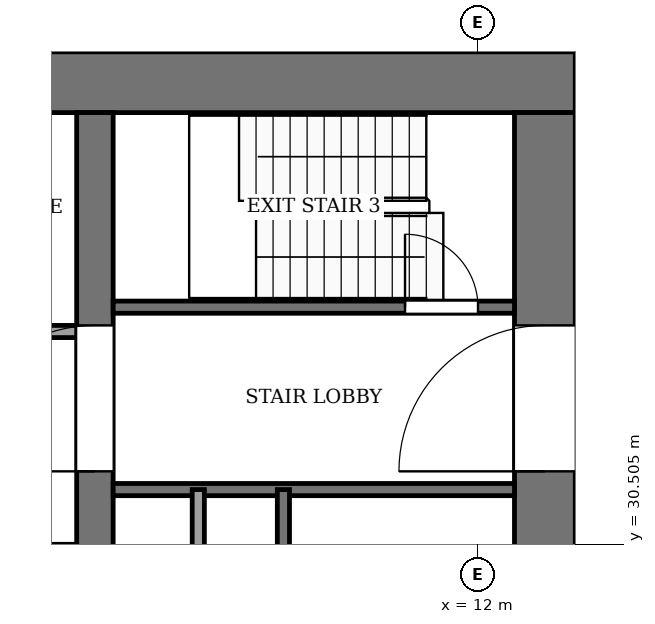
"""IFC4 building model, lengths in metres.
Left out: names, types, materials, properties, quantities, classifications, styles, units other than length and angle.
Written with IfcOpenShell. Run it as: python <this file> out.ifc"""

import sys

from ifc_helpers import new_model, si_unit, direction, frame, frame_2d, origin, place, context, subcontext, project, spatial, rectangle, extrude, element, fill, save


model = new_model("IFC4")
c1 = context("Model", 3, precision=1e-05, world=origin(), true_north=direction((0.0, 1.0)))
c2 = subcontext(c1, "Body", "Model", "MODEL_VIEW")
j1 = project(units=[si_unit("LENGTHUNIT", "METRE"), si_unit("PLANEANGLEUNIT", "RADIAN")], contexts=[c1])
p1 = place(None, origin())
s1 = spatial("IfcSite", under=j1, at=p1, CompositionType="ELEMENT")
p2 = place(p1, origin())
s2 = spatial("IfcBuilding", under=s1, at=p2, CompositionType="ELEMENT")
p3 = place(p2, frame((0.0, 0.0, 142.0)))
s3 = spatial("IfcBuildingStorey", under=s2, at=p3, CompositionType="ELEMENT", Elevation=142.0)
p4 = place(p3, frame((-13.6, 38.1, -0.13), z_axis=(0.0, 0.0, 1.0), x_axis=(1.0, 0.0, 0.0)))
e1 = element("IfcWall", 1, at=p4, inside=s3, PredefinedType="SHEAR", context=c2, shape_type="SweptSolid", body=[
    extrude(rectangle(XDim=27.2, YDim=1.0, at=frame_2d((13.6, 0.0))), origin(), (0.0, 0.0, 1.0), 4.0),
])
p5 = place(p3, frame((13.1, 18.4, -0.13), z_axis=(0.0, 0.0, 1.0), x_axis=(0.0, 1.0, 0.0)))
e2 = element("IfcWall", 2, at=p5, inside=s3, PredefinedType="SHEAR", context=c2, shape_type="SweptSolid", body=[
    extrude(rectangle(XDim=19.2, YDim=1.0, at=frame_2d((9.6, 0.0))), origin(), (0.0, 0.0, 1.0), 4.0),
])
p6 = place(p5, frame((2.8, 0.0, 0.13)))
e3 = element("IfcOpeningElement", 3, at=p6, cuts=e2, PredefinedType="OPENING", context=c2, shape_type="SweptSolid", body=[
    extrude(rectangle(XDim=2.4, YDim=2.4, at=frame_2d((1.2, 1.2))), frame((0.0, 0.51, 0.0), z_axis=(0.0, -1.0, 0.0), x_axis=(1.0, 0.0, 0.0)), (0.0, 0.0, 1.0), 1.02),
])
p7 = place(p5, frame((13.3, 0.0, 0.13)))
e4 = element("IfcOpeningElement", 4, at=p7, cuts=e2, PredefinedType="OPENING", context=c2, shape_type="SweptSolid", body=[
    extrude(rectangle(XDim=2.4, YDim=2.4, at=frame_2d((1.2, 1.2))), frame((0.0, 0.51, 0.0), z_axis=(0.0, -1.0, 0.0), x_axis=(1.0, 0.0, 0.0)), (0.0, 0.0, 1.0), 1.02),
])
p8 = place(p3, frame((5.7, 18.4, -0.13), z_axis=(0.0, 0.0, 1.0), x_axis=(0.0, 1.0, 0.0)))
e5 = element("IfcWall", 5, at=p8, inside=s3, PredefinedType="SHEAR", context=c2, shape_type="SweptSolid", body=[
    extrude(rectangle(XDim=19.2, YDim=0.6, at=frame_2d((9.6, 0.0))), origin(), (0.0, 0.0, 1.0), 4.0),
])
p9 = place(p8, frame((13.3, 0.0, 0.13)))
e6 = element("IfcOpeningElement", 6, at=p9, cuts=e5, PredefinedType="OPENING", context=c2, shape_type="SweptSolid", body=[
    extrude(rectangle(XDim=2.4, YDim=2.4, at=frame_2d((1.2, 1.2))), frame((0.0, 0.31, 0.0), z_axis=(0.0, -1.0, 0.0), x_axis=(1.0, 0.0, 0.0)), (0.0, 0.0, 1.0), 0.62),
])
p10 = place(p3, frame((6.0, 31.4, 0.0), z_axis=(0.0, 0.0, 1.0), x_axis=(1.0, 0.0, 0.0)))
e7 = element("IfcWall", 7, at=p10, inside=s3, PredefinedType="PARTITIONING", context=c2, shape_type="SweptSolid", body=[
    extrude(rectangle(XDim=6.6, YDim=0.2, at=frame_2d((3.3, 0.0))), origin(), (0.0, 0.0, 1.0), 3.87),
])
p11 = place(p3, frame((-5.4, 34.0, 0.0), z_axis=(0.0, 0.0, 1.0), x_axis=(1.0, 0.0, 0.0)))
e8 = element("IfcWall", 8, at=p11, inside=s3, PredefinedType="PARTITIONING", context=c2, shape_type="SweptSolid", body=[
    extrude(rectangle(XDim=10.8, YDim=0.2, at=frame_2d((5.4, 0.0))), origin(), (0.0, 0.0, 1.0), 3.87),
])
p12 = place(p11, frame((6.15, 0.0, 0.0)))
e9 = element("IfcOpeningElement", 9, at=p12, cuts=e8, PredefinedType="OPENING", context=c2, shape_type="SweptSolid", body=[
    extrude(rectangle(XDim=1.2, YDim=2.2, at=frame_2d((0.6, 1.1))), frame((0.0, 0.11, 0.0), z_axis=(0.0, -1.0, 0.0), x_axis=(1.0, 0.0, 0.0)), (0.0, 0.0, 1.0), 0.22),
])
p13 = place(p11, frame((8.95, 0.0, 0.0)))
e10 = element("IfcOpeningElement", 10, at=p13, cuts=e8, PredefinedType="OPENING", context=c2, shape_type="SweptSolid", body=[
    extrude(rectangle(XDim=1.0, YDim=2.1, at=frame_2d((0.5, 1.05))), frame((0.0, 0.11, 0.0), z_axis=(0.0, -1.0, 0.0), x_axis=(1.0, 0.0, 0.0)), (0.0, 0.0, 1.0), 0.22),
])
p14 = place(p3, frame((6.0, 34.4, 0.0), z_axis=(0.0, 0.0, 1.0), x_axis=(1.0, 0.0, 0.0)))
e11 = element("IfcWall", 11, at=p14, inside=s3, PredefinedType="PARTITIONING", context=c2, shape_type="SweptSolid", body=[
    extrude(rectangle(XDim=6.6, YDim=0.2, at=frame_2d((3.3, 0.0))), origin(), (0.0, 0.0, 1.0), 3.87),
])
p15 = place(p14, frame((4.8, 0.0, 0.0)))
e12 = element("IfcOpeningElement", 12, at=p15, cuts=e11, PredefinedType="OPENING", context=c2, shape_type="SweptSolid", body=[
    extrude(rectangle(XDim=1.2, YDim=2.2, at=frame_2d((0.6, 1.1))), frame((0.0, 0.11, 0.0), z_axis=(0.0, -1.0, 0.0), x_axis=(1.0, 0.0, 0.0)), (0.0, 0.0, 1.0), 0.22),
])
for number, where, z_axis, x_axis in (
    (13, (7.4, 24.0, 0.0), (0.0, 0.0, 1.0), (0.0, 1.0, 0.0)),
    (14, (8.8, 24.0, 0.0), (0.0, 0.0, 1.0), (0.0, 1.0, 0.0)),
):
    element("IfcWall", number, at=place(p3, frame(where, z_axis=z_axis, x_axis=x_axis)), inside=s3, PredefinedType="PARTITIONING", context=c2, shape_type="SweptSolid", body=[
        extrude(rectangle(XDim=7.4, YDim=0.2, at=frame_2d((3.7, 0.0))), origin(), (0.0, 0.0, 1.0), 3.87),
    ])
p16 = place(p15, origin())
e15 = element("IfcDoor", 15, at=p16, inside=s3, OperationType="SINGLE_SWING_LEFT", PredefinedType="DOOR", context=c2, shape_type="SweptSolid", body=[
    extrude(rectangle(XDim=1.2, YDim=2.2, at=frame_2d((0.6, 1.1))), frame((0.0, 0.025, 0.0), z_axis=(0.0, -1.0, 0.0), x_axis=(1.0, 0.0, 0.0)), (0.0, 0.0, 1.0), 0.05),
])
fill(e12, e15)
p17 = place(p9, origin())
e16 = element("IfcDoor", 16, at=p17, inside=s3, OperationType="DOUBLE_DOOR_SINGLE_SWING", PredefinedType="DOOR", context=c2, shape_type="SweptSolid", body=[
    extrude(rectangle(XDim=2.4, YDim=2.4, at=frame_2d((1.2, 1.2))), frame((0.0, 0.025, 0.0), z_axis=(0.0, -1.0, 0.0), x_axis=(1.0, 0.0, 0.0)), (0.0, 0.0, 1.0), 0.05),
])
fill(e6, e16)
p18 = place(p7, origin())
e17 = element("IfcDoor", 17, at=p18, inside=s3, OperationType="DOUBLE_DOOR_SINGLE_SWING", PredefinedType="DOOR", context=c2, shape_type="SweptSolid", body=[
    extrude(rectangle(XDim=2.4, YDim=2.4, at=frame_2d((1.2, 1.2))), frame((0.0, 0.025, 0.0), z_axis=(0.0, -1.0, 0.0), x_axis=(1.0, 0.0, 0.0)), (0.0, 0.0, 1.0), 0.05),
])
fill(e4, e17)
save(model, sys.argv[1])
